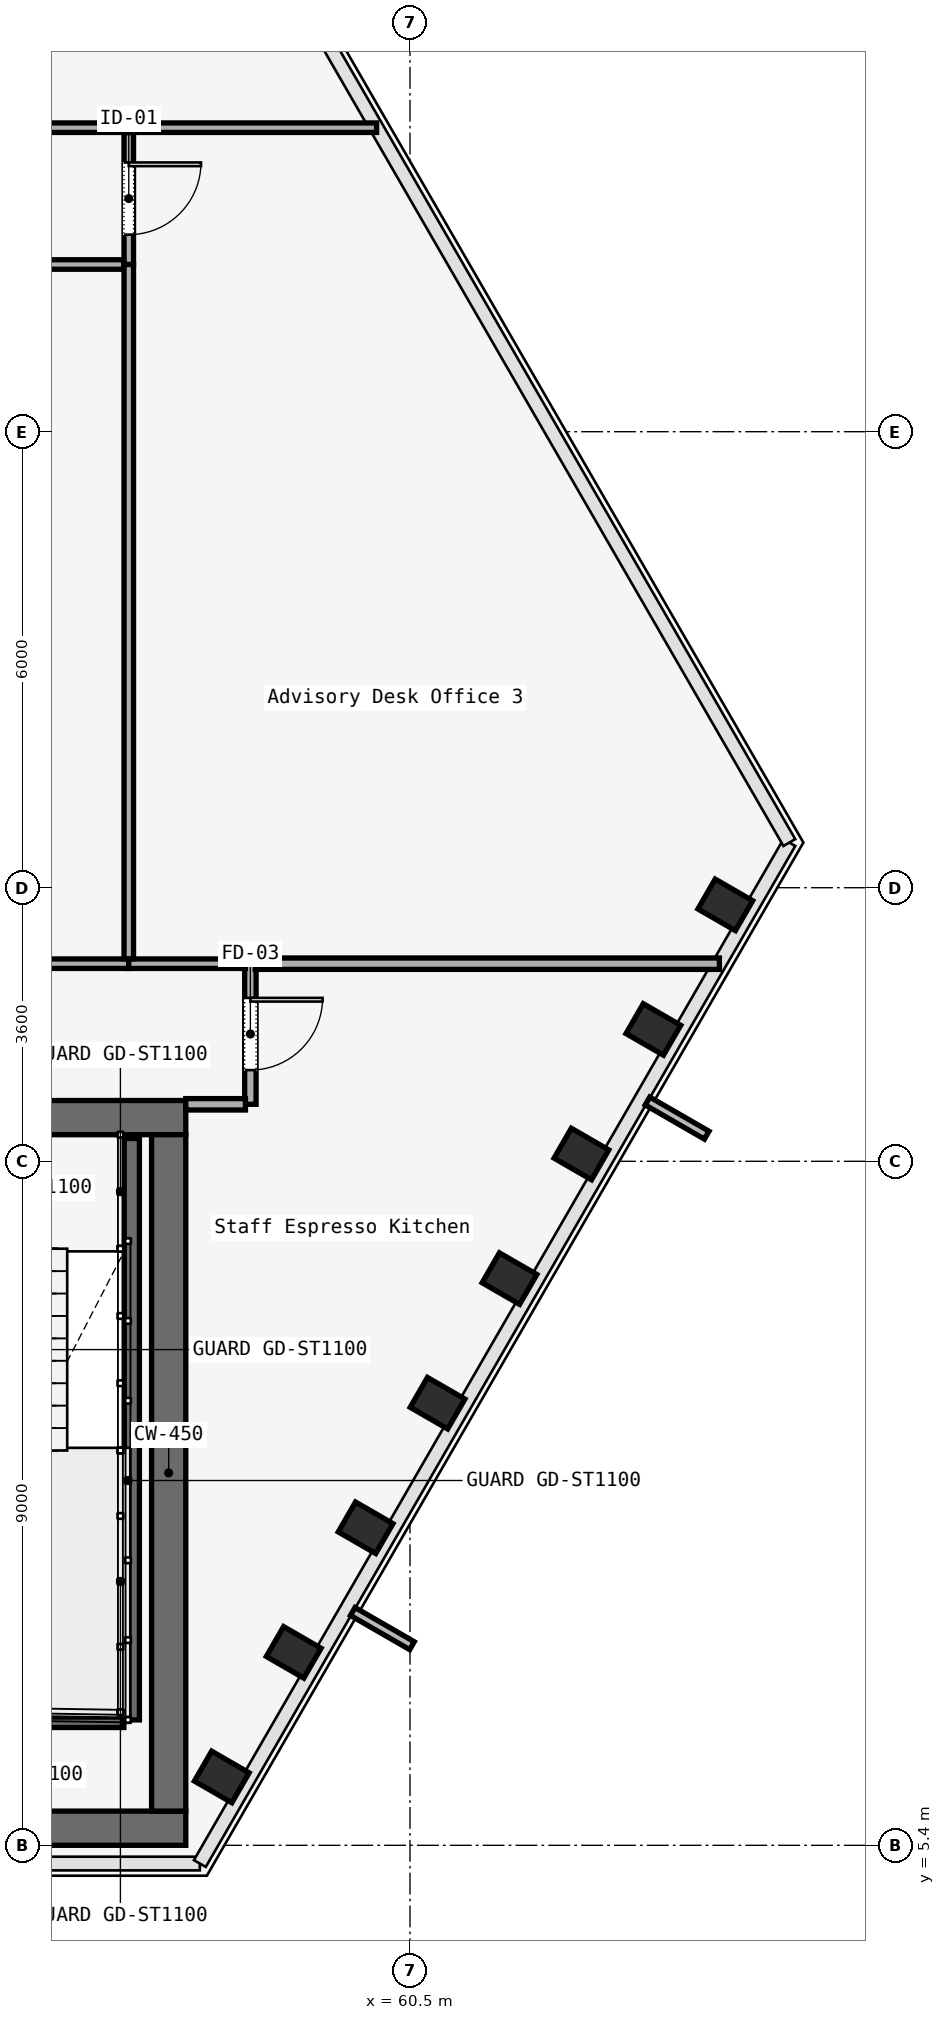
"""IFC4 building model, lengths in metres.
Left out: names, types, materials, properties, quantities, classifications, styles, units other than length and angle.
Written with IfcOpenShell. Run it as: python <this file> out.ifc"""

import sys

from ifc_helpers import new_model, si_unit, direction, frame, frame_2d, origin, origin_2d, place, context, subcontext, project, spatial, rectangle, i_section, extrude, element, fill, save


model = new_model("IFC4")
c1 = context("Model", 3, precision=1e-05, world=origin(), true_north=direction((0.0, 1.0)))
c2 = subcontext(c1, "Body", "Model", "MODEL_VIEW")
j1 = project(units=[si_unit("LENGTHUNIT", "METRE"), si_unit("PLANEANGLEUNIT", "RADIAN")], contexts=[c1])
p1 = place(None, origin())
s1 = spatial("IfcSite", under=j1, at=p1, CompositionType="ELEMENT")
p2 = place(p1, origin())
s2 = spatial("IfcBuilding", under=s1, at=p2, CompositionType="ELEMENT")
p3 = place(p2, frame((0.0, 0.0, 62.6)))
s3 = spatial("IfcBuildingStorey", under=s2, at=p3, CompositionType="ELEMENT", Elevation=62.6)
p4 = place(p3, frame((26.45, 14.975, 0.0), z_axis=(0.0, 0.0, 1.0), x_axis=(1.0, 0.0, 0.0)))
e1 = element("IfcWall", 1, at=p4, inside=s3, PredefinedType="SOLIDWALL", context=c2, shape_type="SweptSolid", body=[
    extrude(rectangle(XDim=31.1, YDim=0.45, at=frame_2d((15.55, 0.0))), origin(), (0.0, 0.0, 1.0), 3.58),
])
p5 = place(p4, frame((1.65, 0.0, 0.0)))
e2 = element("IfcOpeningElement", 2, at=p5, cuts=e1, PredefinedType="OPENING", context=c2, shape_type="SweptSolid", body=[
    extrude(rectangle(XDim=1.1, YDim=2.2, at=frame_2d((0.55, 1.1))), frame((0.0, 0.225, 0.0), z_axis=(0.0, -1.0, 0.0), x_axis=(1.0, 0.0, 0.0)), (0.0, 0.0, 1.0), 0.45),
])
p6 = place(p4, frame((13.65, 0.0, 0.0)))
e3 = element("IfcOpeningElement", 3, at=p6, cuts=e1, PredefinedType="OPENING", context=c2, shape_type="SweptSolid", body=[
    extrude(rectangle(XDim=1.1, YDim=2.2, at=frame_2d((0.55, 1.1))), frame((0.0, 0.225, 0.0), z_axis=(0.0, -1.0, 0.0), x_axis=(1.0, 0.0, 0.0)), (0.0, 0.0, 1.0), 0.45),
])
p7 = place(p4, frame((25.55, 0.0, 0.0)))
e4 = element("IfcOpeningElement", 4, at=p7, cuts=e1, PredefinedType="OPENING", context=c2, shape_type="SweptSolid", body=[
    extrude(rectangle(XDim=1.1, YDim=2.2, at=frame_2d((0.55, 1.1))), frame((0.0, 0.225, 0.0), z_axis=(0.0, -1.0, 0.0), x_axis=(1.0, 0.0, 0.0)), (0.0, 0.0, 1.0), 0.45),
])
p8 = place(p4, frame((10.7, 0.0, 0.0)))
e5 = element("IfcOpeningElement", 5, at=p8, cuts=e1, PredefinedType="OPENING", context=c2, shape_type="SweptSolid", body=[
    extrude(rectangle(XDim=1.4, YDim=2.2, at=frame_2d((0.7, 1.1))), frame((0.0, 0.225, 0.0), z_axis=(0.0, -1.0, 0.0), x_axis=(1.0, 0.0, 0.0)), (0.0, 0.0, 1.0), 0.45),
])
p9 = place(p4, frame((19.35, 0.0, 0.0)))
e6 = element("IfcOpeningElement", 6, at=p9, cuts=e1, PredefinedType="OPENING", context=c2, shape_type="SweptSolid", body=[
    extrude(rectangle(XDim=1.1, YDim=2.2, at=frame_2d((0.55, 1.1))), frame((0.0, 0.225, 0.0), z_axis=(0.0, -1.0, 0.0), x_axis=(1.0, 0.0, 0.0)), (0.0, 0.0, 1.0), 0.45),
])
p10 = place(p4, frame((21.4, 0.0, 0.0)))
e7 = element("IfcOpeningElement", 7, at=p10, cuts=e1, PredefinedType="OPENING", context=c2, shape_type="SweptSolid", body=[
    extrude(rectangle(XDim=0.9, YDim=2.1, at=frame_2d((0.45, 1.05))), frame((0.0, 0.225, 0.0), z_axis=(0.0, -1.0, 0.0), x_axis=(1.0, 0.0, 0.0)), (0.0, 0.0, 1.0), 0.45),
])
p11 = place(p4, frame((23.35, 0.0, 0.0)))
e8 = element("IfcOpeningElement", 8, at=p11, cuts=e1, PredefinedType="OPENING", context=c2, shape_type="SweptSolid", body=[
    extrude(rectangle(XDim=1.3, YDim=2.3, at=frame_2d((0.65, 1.15))), frame((0.0, 0.225, 0.0), z_axis=(0.0, -1.0, 0.0), x_axis=(1.0, 0.0, 0.0)), (0.0, 0.0, 1.0), 0.45),
])
p12 = place(p3, frame((26.45, 5.625, 0.0), z_axis=(0.0, 0.0, 1.0), x_axis=(1.0, 0.0, 0.0)))
e9 = element("IfcWall", 9, at=p12, inside=s3, PredefinedType="SOLIDWALL", context=c2, shape_type="SweptSolid", body=[
    extrude(rectangle(XDim=31.1, YDim=0.45, at=frame_2d((15.55, 0.0))), origin(), (0.0, 0.0, 1.0), 3.58),
])
p13 = place(p3, frame((57.325, 5.85, 0.0), z_axis=(0.0, 0.0, 1.0), x_axis=(0.0, 1.0, 0.0)))
e10 = element("IfcWall", 10, at=p13, inside=s3, PredefinedType="SOLIDWALL", context=c2, shape_type="SweptSolid", body=[
    extrude(rectangle(XDim=8.9, YDim=0.45, at=frame_2d((4.45, 0.0))), origin(), (0.0, 0.0, 1.0), 3.58),
])
for number, where, z_axis, x_axis in (
    (11, (58.023, 6.3, 0.0), (0.0, 0.0, 1.0), (0.5, 0.866, 0.0)),
    (12, (58.97, 7.939, 0.0), (0.0, 0.0, 1.0), (0.5, 0.866, 0.0)),
    (13, (59.916, 9.578, 0.0), (0.0, 0.0, 1.0), (0.5, 0.866, 0.0)),
    (14, (60.863, 11.217, 0.0), (0.0, 0.0, 1.0), (0.5, 0.866, 0.0)),
    (15, (61.809, 12.857, 0.0), (0.0, 0.0, 1.0), (0.5, 0.866, 0.0)),
    (16, (62.756, 14.496, 0.0), (0.0, 0.0, 1.0), (0.5, 0.866, 0.0)),
    (17, (63.702, 16.135, 0.0), (0.0, 0.0, 1.0), (0.5, 0.866, 0.0)),
    (18, (64.648, 17.774, 0.0), (0.0, 0.0, 1.0), (0.5, 0.866, 0.0)),
):
    element("IfcColumn", number, at=place(p3, frame(where, z_axis=z_axis, x_axis=x_axis)), inside=s3, PredefinedType="COLUMN", context=c2, shape_type="SweptSolid", body=[
        extrude(i_section(OverallWidth=0.454, OverallDepth=0.569, WebThickness=0.078, FlangeThickness=0.08, FilletRadius=0.015, at=origin_2d()), origin(), (0.0, 0.0, 1.0), 3.58),
    ])
p14 = place(p3, frame((56.84, 14.7, 0.0), z_axis=(0.0, 0.0, 1.0), x_axis=(0.0, -1.0, 0.0)))
e19 = element("IfcWall", 19, at=p14, inside=s3, PredefinedType="SOLIDWALL", context=c2, shape_type="SweptSolid", body=[
    extrude(rectangle(XDim=7.65, YDim=0.2, at=frame_2d((3.825, 0.0))), origin(), (0.0, 0.0, 1.0), 3.8),
])
p15 = place(p3, frame((53.62, 7.05, 0.0), z_axis=(0.0, 0.0, 1.0), x_axis=(1.0, 0.0, 0.0)))
e20 = element("IfcWall", 20, at=p15, inside=s3, PredefinedType="SOLIDWALL", context=c2, shape_type="SweptSolid", body=[
    extrude(rectangle(XDim=3.115, YDim=0.2, at=frame_2d((1.558, 0.0))), origin(), (0.0, 0.0, 1.0), 3.8),
])
p16 = place(p3, frame((58.4, 17.0, 0.0), z_axis=(0.0, 0.0, 1.0), x_axis=(0.0, -1.0, 0.0)))
e21 = element("IfcWall", 21, at=p16, inside=s3, PredefinedType="PARTITIONING", context=c2, shape_type="SweptSolid", body=[
    extrude(rectangle(XDim=1.85, YDim=0.15, at=frame_2d((0.925, 0.0))), origin(), (0.0, 0.0, 1.0), 2.933),
])
p17 = place(p16, frame((0.45, 0.0, 0.0)))
e22 = element("IfcOpeningElement", 22, at=p17, cuts=e21, PredefinedType="OPENING", context=c2, shape_type="SweptSolid", body=[
    extrude(rectangle(XDim=0.95, YDim=2.2, at=frame_2d((0.475, 1.1))), frame((0.0, 0.075, 0.0), z_axis=(0.0, -1.0, 0.0), x_axis=(1.0, 0.0, 0.0)), (0.0, 0.0, 1.0), 0.15),
])
p18 = place(p3, frame((58.335, 15.15, 0.0), z_axis=(0.0, 0.0, 1.0), x_axis=(-1.0, 0.0, 0.0)))
e23 = element("IfcWall", 23, at=p18, inside=s3, PredefinedType="PARTITIONING", context=c2, shape_type="SweptSolid", body=[
    extrude(rectangle(XDim=0.785, YDim=0.15, at=frame_2d((0.393, 0.0))), origin(), (0.0, 0.0, 1.0), 2.933),
])
p19 = place(p3, frame((49.0, 28.0, 0.0), z_axis=(0.0, 0.0, 1.0), x_axis=(1.0, 0.0, 0.0)))
e24 = element("IfcWall", 24, at=p19, inside=s3, PredefinedType="PARTITIONING", context=c2, shape_type="SweptSolid", body=[
    extrude(rectangle(XDim=7.8, YDim=0.125, at=frame_2d((3.9, 0.0))), origin(), (0.0, 0.0, 1.0), 2.933),
])
p20 = place(p19, frame((3.425, 0.0, 0.0)))
e25 = element("IfcOpeningElement", 25, at=p20, cuts=e24, PredefinedType="OPENING", context=c2, shape_type="SweptSolid", body=[
    extrude(rectangle(XDim=0.95, YDim=2.2, at=frame_2d((0.475, 1.1))), frame((0.0, 0.062, 0.0), z_axis=(0.0, -1.0, 0.0), x_axis=(1.0, 0.0, 0.0)), (0.0, 0.0, 1.0), 0.125),
])
p21 = place(p3, frame((56.8, 27.935, 0.0), z_axis=(0.0, 0.0, 1.0), x_axis=(0.0, -1.0, 0.0)))
e26 = element("IfcWall", 26, at=p21, inside=s3, PredefinedType="PARTITIONING", context=c2, shape_type="SweptSolid", body=[
    extrude(rectangle(XDim=1.735, YDim=0.125, at=frame_2d((0.868, 0.0))), origin(), (0.0, 0.0, 1.0), 2.933),
])
p22 = place(p21, frame((0.393, 0.0, 0.0)))
e27 = element("IfcOpeningElement", 27, at=p22, cuts=e26, PredefinedType="OPENING", context=c2, shape_type="SweptSolid", body=[
    extrude(rectangle(XDim=0.95, YDim=2.2, at=frame_2d((0.475, 1.1))), frame((0.0, 0.062, 0.0), z_axis=(0.0, -1.0, 0.0), x_axis=(1.0, 0.0, 0.0)), (0.0, 0.0, 1.0), 0.125),
])
p23 = place(p3, frame((56.735, 26.2, 0.0), z_axis=(0.0, 0.0, 1.0), x_axis=(-1.0, 0.0, 0.0)))
e28 = element("IfcWall", 28, at=p23, inside=s3, PredefinedType="PARTITIONING", context=c2, shape_type="SweptSolid", body=[
    extrude(rectangle(XDim=11.92, YDim=0.125, at=frame_2d((5.96, 0.0))), origin(), (0.0, 0.0, 1.0), 2.933),
])
p24 = place(p3, frame((44.815, 17.0, 0.0), z_axis=(0.0, 0.0, 1.0), x_axis=(1.0, 0.0, 0.0)))
e29 = element("IfcWall", 29, at=p24, inside=s3, PredefinedType="PARTITIONING", context=c2, shape_type="SweptSolid", body=[
    extrude(rectangle(XDim=11.985, YDim=0.125, at=frame_2d((5.993, 0.0))), origin(), (0.0, 0.0, 1.0), 2.933),
])
p25 = place(p24, frame((5.518, 0.0, 0.0)))
e30 = element("IfcOpeningElement", 30, at=p25, cuts=e29, PredefinedType="OPENING", context=c2, shape_type="SweptSolid", body=[
    extrude(rectangle(XDim=0.95, YDim=2.2, at=frame_2d((0.475, 1.1))), frame((0.0, 0.062, 0.0), z_axis=(0.0, -1.0, 0.0), x_axis=(1.0, 0.0, 0.0)), (0.0, 0.0, 1.0), 0.125),
])
p26 = place(p3, frame((56.8, 17.0, 0.0), z_axis=(0.0, 0.0, 1.0), x_axis=(1.0, 0.0, 0.0)))
e31 = element("IfcWall", 31, at=p26, inside=s3, PredefinedType="PARTITIONING", context=c2, shape_type="SweptSolid", body=[
    extrude(rectangle(XDim=1.535, YDim=0.125, at=frame_2d((0.768, 0.0))), origin(), (0.0, 0.0, 1.0), 2.933),
])
p27 = place(p3, frame((58.465, 17.0, 0.0), z_axis=(0.0, 0.0, 1.0), x_axis=(1.0, 0.0, 0.0)))
e32 = element("IfcWall", 32, at=p27, inside=s3, PredefinedType="PARTITIONING", context=c2, shape_type="SweptSolid", body=[
    extrude(rectangle(XDim=6.106, YDim=0.15, at=frame_2d((3.053, 0.0))), origin(), (0.0, 0.0, 1.0), 2.933),
])
p28 = place(p3, frame((56.8, 26.2, 0.0), z_axis=(0.0, 0.0, 1.0), x_axis=(0.0, -1.0, 0.0)))
e33 = element("IfcWall", 33, at=p28, inside=s3, PredefinedType="PARTITIONING", context=c2, shape_type="SweptSolid", body=[
    extrude(rectangle(XDim=9.135, YDim=0.125, at=frame_2d((4.567, 0.0))), origin(), (0.0, 0.0, 1.0), 2.933),
])
p29 = place(p3, frame((56.8, 28.0, 0.0), z_axis=(0.0, 0.0, 1.0), x_axis=(1.0, 0.0, 0.0)))
e34 = element("IfcWall", 34, at=p29, inside=s3, PredefinedType="PARTITIONING", context=c2, shape_type="SweptSolid", body=[
    extrude(rectangle(XDim=3.26, YDim=0.125, at=frame_2d((1.63, 0.0))), origin(), (0.0, 0.0, 1.0), 2.933),
])
p30 = place(p17, origin())
e35 = element("IfcDoor", 35, at=p30, inside=s3, OperationType="SINGLE_SWING_LEFT", PredefinedType="DOOR", context=c2, shape_type="SweptSolid", body=[
    extrude(rectangle(XDim=0.95, YDim=2.2, at=frame_2d((0.475, 1.1))), frame((0.0, 0.025, 0.0), z_axis=(0.0, -1.0, 0.0), x_axis=(1.0, 0.0, 0.0)), (0.0, 0.0, 1.0), 0.05),
])
fill(e22, e35)
p31 = place(p22, origin())
e36 = element("IfcDoor", 36, at=p31, inside=s3, OperationType="SINGLE_SWING_RIGHT", PredefinedType="DOOR", context=c2, shape_type="SweptSolid", body=[
    extrude(rectangle(XDim=0.95, YDim=2.2, at=frame_2d((0.475, 1.1))), frame((0.0, 0.025, 0.0), z_axis=(0.0, -1.0, 0.0), x_axis=(1.0, 0.0, 0.0)), (0.0, 0.0, 1.0), 0.05),
])
fill(e27, e36)
save(model, sys.argv[1])
